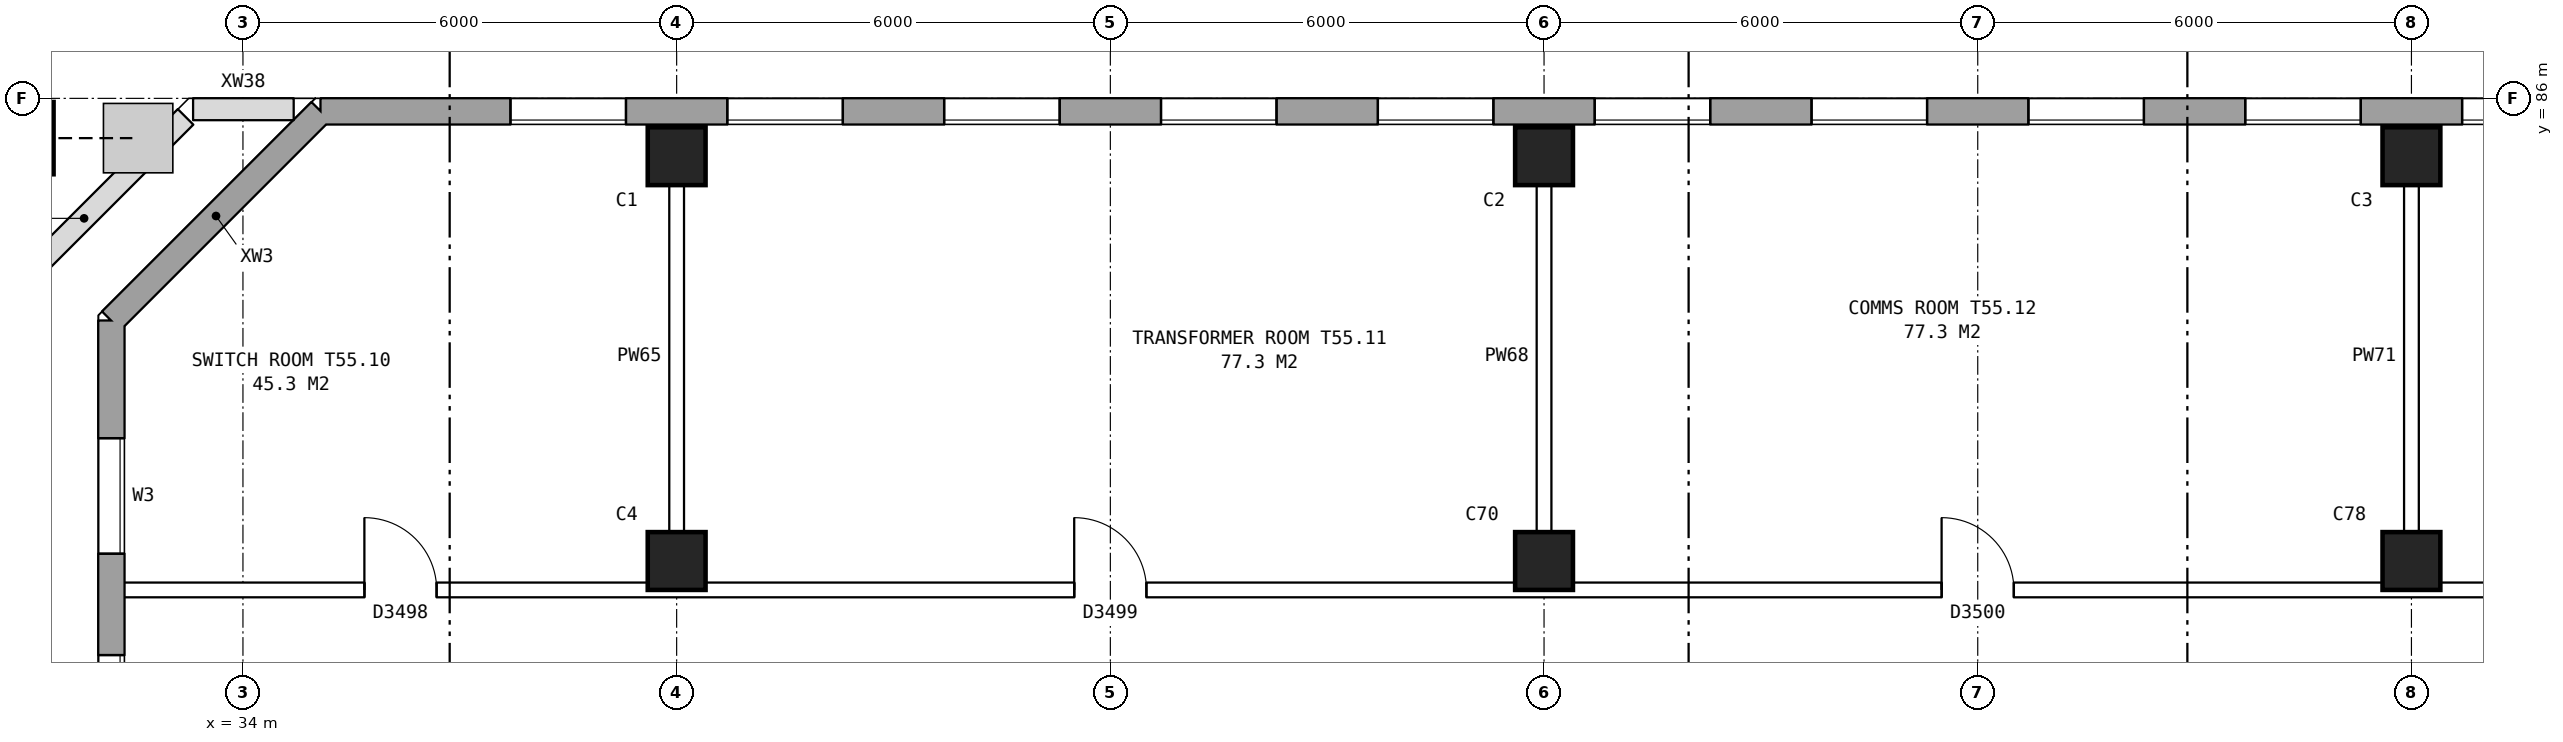
"""IFC4 building model, lengths in metres.
Left out: names, types, materials, properties, quantities, classifications, styles, units other than length and angle.
Written with IfcOpenShell. Run it as: python <this file> out.ifc"""

import sys

from ifc_helpers import new_model, si_unit, direction, frame, frame_2d, origin, origin_2d, place, context, subcontext, project, spatial, rectangle, hollow_rectangle, extrude, element, fill, save


model = new_model("IFC4")
c1 = context("Model", 3, precision=1e-05, world=origin(), true_north=direction((0.0, 1.0)))
c2 = subcontext(c1, "Body", "Model", "MODEL_VIEW")
j1 = project(units=[si_unit("LENGTHUNIT", "METRE"), si_unit("PLANEANGLEUNIT", "RADIAN")], contexts=[c1])
p1 = place(None, origin())
s1 = spatial("IfcSite", under=j1, at=p1, CompositionType="ELEMENT")
p2 = place(p1, origin())
s2 = spatial("IfcBuilding", under=s1, at=p2, CompositionType="ELEMENT")
p3 = place(p2, frame((0.0, 0.0, 194.4)))
s3 = spatial("IfcBuildingStorey", under=s2, at=p3, CompositionType="ELEMENT", Elevation=194.4)
for number, where, z_axis, x_axis in (
    (1, (40.0, 79.6, 0.0), (0.0, 0.0, 1.0), (1.0, 0.0, 0.0)),
    (2, (40.0, 85.2, 0.0), (0.0, 0.0, 1.0), (1.0, 0.0, 0.0)),
    (3, (52.0, 79.6, 0.0), (0.0, 0.0, 1.0), (1.0, 0.0, 0.0)),
    (4, (52.0, 85.2, 0.0), (0.0, 0.0, 1.0), (1.0, 0.0, 0.0)),
    (5, (64.0, 79.6, 0.0), (0.0, 0.0, 1.0), (1.0, 0.0, 0.0)),
    (6, (64.0, 85.2, 0.0), (0.0, 0.0, 1.0), (1.0, 0.0, 0.0)),
):
    element("IfcColumn", number, at=place(p3, frame(where, z_axis=z_axis, x_axis=x_axis)), inside=s3, PredefinedType="COLUMN", context=c2, shape_type="SweptSolid", body=[
        extrude(rectangle(XDim=0.8, YDim=0.8, at=origin_2d()), origin(), (0.0, 0.0, 1.0), 3.95),
    ])
p4 = place(p3, frame((30.88, 85.45, 0.192), z_axis=(0.384632160448, 0.0, 0.923069932968), x_axis=(0.0, 1.0, 0.0)))
e7 = element("IfcColumn", 7, at=p4, inside=s3, PredefinedType="COLUMN", context=c2, shape_type="SweptSolid", body=[
    extrude(hollow_rectangle(XDim=1.0, YDim=1.0, WallThickness=0.055, at=origin_2d()), origin(), (0.0, 0.0, 1.0), 4.133),
])
p5 = place(p3, frame((74.95, 85.82, 0.0), z_axis=(0.0, 0.0, 1.0), x_axis=(-1.0, 0.0, 0.0)))
e8 = element("IfcWall", 8, at=p5, inside=s3, PredefinedType="STANDARD", context=c2, shape_type="SweptSolid", body=[
    extrude(rectangle(XDim=39.875, YDim=0.36, at=frame_2d((19.938, 0.0))), origin(), (0.0, 0.0, 1.0), 3.95),
])
p6 = place(p5, frame((2.65, 0.0, 1.5)))
e9 = element("IfcOpeningElement", 9, at=p6, cuts=e8, PredefinedType="OPENING", context=c2, shape_type="SweptSolid", body=[
    extrude(rectangle(XDim=1.6, YDim=1.2, at=frame_2d((0.8, 0.6))), frame((0.0, 0.19, 0.0), z_axis=(0.0, -1.0, 0.0), x_axis=(1.0, 0.0, 0.0)), (0.0, 0.0, 1.0), 0.38),
])
p7 = place(p5, frame((5.65, 0.0, 1.5)))
e10 = element("IfcOpeningElement", 10, at=p7, cuts=e8, PredefinedType="OPENING", context=c2, shape_type="SweptSolid", body=[
    extrude(rectangle(XDim=1.6, YDim=1.2, at=frame_2d((0.8, 0.6))), frame((0.0, 0.19, 0.0), z_axis=(0.0, -1.0, 0.0), x_axis=(1.0, 0.0, 0.0)), (0.0, 0.0, 1.0), 0.38),
])
p8 = place(p5, frame((8.65, 0.0, 1.5)))
e11 = element("IfcOpeningElement", 11, at=p8, cuts=e8, PredefinedType="OPENING", context=c2, shape_type="SweptSolid", body=[
    extrude(rectangle(XDim=1.6, YDim=1.2, at=frame_2d((0.8, 0.6))), frame((0.0, 0.19, 0.0), z_axis=(0.0, -1.0, 0.0), x_axis=(1.0, 0.0, 0.0)), (0.0, 0.0, 1.0), 0.38),
])
p9 = place(p5, frame((11.65, 0.0, 1.5)))
e12 = element("IfcOpeningElement", 12, at=p9, cuts=e8, PredefinedType="OPENING", context=c2, shape_type="SweptSolid", body=[
    extrude(rectangle(XDim=1.6, YDim=1.2, at=frame_2d((0.8, 0.6))), frame((0.0, 0.19, 0.0), z_axis=(0.0, -1.0, 0.0), x_axis=(1.0, 0.0, 0.0)), (0.0, 0.0, 1.0), 0.38),
])
p10 = place(p5, frame((14.65, 0.0, 1.5)))
e13 = element("IfcOpeningElement", 13, at=p10, cuts=e8, PredefinedType="OPENING", context=c2, shape_type="SweptSolid", body=[
    extrude(rectangle(XDim=1.6, YDim=1.2, at=frame_2d((0.8, 0.6))), frame((0.0, 0.19, 0.0), z_axis=(0.0, -1.0, 0.0), x_axis=(1.0, 0.0, 0.0)), (0.0, 0.0, 1.0), 0.38),
])
p11 = place(p5, frame((17.65, 0.0, 1.5)))
e14 = element("IfcOpeningElement", 14, at=p11, cuts=e8, PredefinedType="OPENING", context=c2, shape_type="SweptSolid", body=[
    extrude(rectangle(XDim=1.6, YDim=1.2, at=frame_2d((0.8, 0.6))), frame((0.0, 0.19, 0.0), z_axis=(0.0, -1.0, 0.0), x_axis=(1.0, 0.0, 0.0)), (0.0, 0.0, 1.0), 0.38),
])
p12 = place(p5, frame((20.65, 0.0, 1.5)))
e15 = element("IfcOpeningElement", 15, at=p12, cuts=e8, PredefinedType="OPENING", context=c2, shape_type="SweptSolid", body=[
    extrude(rectangle(XDim=1.6, YDim=1.2, at=frame_2d((0.8, 0.6))), frame((0.0, 0.19, 0.0), z_axis=(0.0, -1.0, 0.0), x_axis=(1.0, 0.0, 0.0)), (0.0, 0.0, 1.0), 0.38),
])
p13 = place(p5, frame((23.65, 0.0, 1.5)))
e16 = element("IfcOpeningElement", 16, at=p13, cuts=e8, PredefinedType="OPENING", context=c2, shape_type="SweptSolid", body=[
    extrude(rectangle(XDim=1.6, YDim=1.2, at=frame_2d((0.8, 0.6))), frame((0.0, 0.19, 0.0), z_axis=(0.0, -1.0, 0.0), x_axis=(1.0, 0.0, 0.0)), (0.0, 0.0, 1.0), 0.38),
])
p14 = place(p5, frame((26.65, 0.0, 1.5)))
e17 = element("IfcOpeningElement", 17, at=p14, cuts=e8, PredefinedType="OPENING", context=c2, shape_type="SweptSolid", body=[
    extrude(rectangle(XDim=1.6, YDim=1.2, at=frame_2d((0.8, 0.6))), frame((0.0, 0.19, 0.0), z_axis=(0.0, -1.0, 0.0), x_axis=(1.0, 0.0, 0.0)), (0.0, 0.0, 1.0), 0.38),
])
p15 = place(p5, frame((29.65, 0.0, 1.5)))
e18 = element("IfcOpeningElement", 18, at=p15, cuts=e8, PredefinedType="OPENING", context=c2, shape_type="SweptSolid", body=[
    extrude(rectangle(XDim=1.6, YDim=1.2, at=frame_2d((0.8, 0.6))), frame((0.0, 0.19, 0.0), z_axis=(0.0, -1.0, 0.0), x_axis=(1.0, 0.0, 0.0)), (0.0, 0.0, 1.0), 0.38),
])
p16 = place(p5, frame((32.65, 0.0, 1.5)))
e19 = element("IfcOpeningElement", 19, at=p16, cuts=e8, PredefinedType="OPENING", context=c2, shape_type="SweptSolid", body=[
    extrude(rectangle(XDim=1.6, YDim=1.2, at=frame_2d((0.8, 0.6))), frame((0.0, 0.19, 0.0), z_axis=(0.0, -1.0, 0.0), x_axis=(1.0, 0.0, 0.0)), (0.0, 0.0, 1.0), 0.38),
])
p17 = place(p5, frame((35.65, 0.0, 1.5)))
e20 = element("IfcOpeningElement", 20, at=p17, cuts=e8, PredefinedType="OPENING", context=c2, shape_type="SweptSolid", body=[
    extrude(rectangle(XDim=1.6, YDim=1.2, at=frame_2d((0.8, 0.6))), frame((0.0, 0.19, 0.0), z_axis=(0.0, -1.0, 0.0), x_axis=(1.0, 0.0, 0.0)), (0.0, 0.0, 1.0), 0.38),
])
p18 = place(p3, frame((35.075, 85.82, 0.0), z_axis=(0.0, 0.0, 1.0), x_axis=(-0.707106781187, -0.707106781187, 0.0)))
e21 = element("IfcWall", 21, at=p18, inside=s3, PredefinedType="STANDARD", context=c2, shape_type="SweptSolid", body=[
    extrude(rectangle(XDim=4.094, YDim=0.36, at=frame_2d((2.047, 0.0))), origin(), (0.0, 0.0, 1.0), 3.95),
])
p19 = place(p3, frame((32.18, 82.925, 0.0), z_axis=(0.0, 0.0, 1.0), x_axis=(0.0, -1.0, 0.0)))
e22 = element("IfcWall", 22, at=p19, inside=s3, PredefinedType="STANDARD", context=c2, shape_type="SweptSolid", body=[
    extrude(rectangle(XDim=25.851, YDim=0.36, at=frame_2d((12.925, 0.0))), origin(), (0.0, 0.0, 1.0), 3.95),
])
p20 = place(p19, frame((1.625, 0.0, 1.5)))
e23 = element("IfcOpeningElement", 23, at=p20, cuts=e22, PredefinedType="OPENING", context=c2, shape_type="SweptSolid", body=[
    extrude(rectangle(XDim=1.6, YDim=1.2, at=frame_2d((0.8, 0.6))), frame((0.0, 0.19, 0.0), z_axis=(0.0, -1.0, 0.0), x_axis=(1.0, 0.0, 0.0)), (0.0, 0.0, 1.0), 0.38),
])
p21 = place(p19, frame((4.625, 0.0, 1.5)))
e24 = element("IfcOpeningElement", 24, at=p21, cuts=e22, PredefinedType="OPENING", context=c2, shape_type="SweptSolid", body=[
    extrude(rectangle(XDim=1.6, YDim=1.2, at=frame_2d((0.8, 0.6))), frame((0.0, 0.19, 0.0), z_axis=(0.0, -1.0, 0.0), x_axis=(1.0, 0.0, 0.0)), (0.0, 0.0, 1.0), 0.38),
])
p22 = place(p19, frame((19.625, 0.0, 1.5)))
e25 = element("IfcOpeningElement", 25, at=p22, cuts=e22, PredefinedType="OPENING", context=c2, shape_type="SweptSolid", body=[
    extrude(rectangle(XDim=1.6, YDim=1.2, at=frame_2d((0.8, 0.6))), frame((0.0, 0.19, 0.0), z_axis=(0.0, -1.0, 0.0), x_axis=(1.0, 0.0, 0.0)), (0.0, 0.0, 1.0), 0.38),
])
p23 = place(p19, frame((22.625, 0.0, 1.5)))
e26 = element("IfcOpeningElement", 26, at=p23, cuts=e22, PredefinedType="OPENING", context=c2, shape_type="SweptSolid", body=[
    extrude(rectangle(XDim=1.6, YDim=1.2, at=frame_2d((0.8, 0.6))), frame((0.0, 0.19, 0.0), z_axis=(0.0, -1.0, 0.0), x_axis=(1.0, 0.0, 0.0)), (0.0, 0.0, 1.0), 0.38),
])
p24 = place(p3, frame((34.7, 85.85, 0.0), z_axis=(0.0, 0.0, 1.0), x_axis=(-1.0, 0.0, 0.0)))
e27 = element("IfcWall", 27, at=p24, inside=s3, PredefinedType="PARAPET", context=c2, shape_type="SweptSolid", body=[
    extrude(rectangle(XDim=1.388, YDim=0.3, at=frame_2d((0.694, 0.0))), origin(), (0.0, 0.0, 1.0), 1.1),
])
p25 = place(p3, frame((33.205, 85.742, 0.0), z_axis=(0.0, 0.0, 1.0), x_axis=(-0.707137557743, -0.70707600329, 0.0)))
e28 = element("IfcWall", 28, at=p25, inside=s3, PredefinedType="PARAPET", context=c2, shape_type="SweptSolid", body=[
    extrude(rectangle(XDim=3.966, YDim=0.3, at=frame_2d((1.983, 0.0))), origin(), (0.0, 0.0, 1.0), 1.1),
])
p26 = place(p3, frame((32.24, 79.2, 0.0), z_axis=(0.0, 0.0, 1.0), x_axis=(1.0, 0.0, 0.0)))
e29 = element("IfcWall", 29, at=p26, inside=s3, PredefinedType="PARTITIONING", context=c2, shape_type="SweptSolid", body=[
    extrude(rectangle(XDim=57.61, YDim=0.2, at=frame_2d((28.805, 0.0))), origin(), (0.0, 0.0, 1.0), 3.95),
])
p27 = place(p26, frame((3.44, 0.0, 0.0)))
e30 = element("IfcOpeningElement", 30, at=p27, cuts=e29, PredefinedType="OPENING", context=c2, shape_type="SweptSolid", body=[
    extrude(rectangle(XDim=1.0, YDim=2.1, at=frame_2d((0.5, 1.05))), frame((0.0, 0.11, 0.0), z_axis=(0.0, -1.0, 0.0), x_axis=(1.0, 0.0, 0.0)), (0.0, 0.0, 1.0), 0.22),
])
p28 = place(p26, frame((13.26, 0.0, 0.0)))
e31 = element("IfcOpeningElement", 31, at=p28, cuts=e29, PredefinedType="OPENING", context=c2, shape_type="SweptSolid", body=[
    extrude(rectangle(XDim=1.0, YDim=2.1, at=frame_2d((0.5, 1.05))), frame((0.0, 0.11, 0.0), z_axis=(0.0, -1.0, 0.0), x_axis=(1.0, 0.0, 0.0)), (0.0, 0.0, 1.0), 0.22),
])
p29 = place(p26, frame((25.26, 0.0, 0.0)))
e32 = element("IfcOpeningElement", 32, at=p29, cuts=e29, PredefinedType="OPENING", context=c2, shape_type="SweptSolid", body=[
    extrude(rectangle(XDim=1.0, YDim=2.1, at=frame_2d((0.5, 1.05))), frame((0.0, 0.11, 0.0), z_axis=(0.0, -1.0, 0.0), x_axis=(1.0, 0.0, 0.0)), (0.0, 0.0, 1.0), 0.22),
])
p30 = place(p26, frame((37.08, 0.0, 0.0)))
e33 = element("IfcOpeningElement", 33, at=p30, cuts=e29, PredefinedType="OPENING", context=c2, shape_type="SweptSolid", body=[
    extrude(rectangle(XDim=1.0, YDim=2.1, at=frame_2d((0.5, 1.05))), frame((0.0, 0.11, 0.0), z_axis=(0.0, -1.0, 0.0), x_axis=(1.0, 0.0, 0.0)), (0.0, 0.0, 1.0), 0.22),
])
p31 = place(p26, frame((49.955, 0.0, 0.0)))
e34 = element("IfcOpeningElement", 34, at=p31, cuts=e29, PredefinedType="OPENING", context=c2, shape_type="SweptSolid", body=[
    extrude(rectangle(XDim=1.0, YDim=2.1, at=frame_2d((0.5, 1.05))), frame((0.0, 0.11, 0.0), z_axis=(0.0, -1.0, 0.0), x_axis=(1.0, 0.0, 0.0)), (0.0, 0.0, 1.0), 0.22),
])
for number, where, z_axis, x_axis in (
    (35, (40.0, 79.1, 0.0), (0.0, 0.0, 1.0), (0.0, 1.0, 0.0)),
    (36, (52.0, 79.1, 0.0), (0.0, 0.0, 1.0), (0.0, 1.0, 0.0)),
    (37, (64.0, 79.1, 0.0), (0.0, 0.0, 1.0), (0.0, 1.0, 0.0)),
):
    element("IfcWall", number, at=place(p3, frame(where, z_axis=z_axis, x_axis=x_axis)), inside=s3, PredefinedType="PARTITIONING", context=c2, shape_type="SweptSolid", body=[
        extrude(rectangle(XDim=6.66, YDim=0.2, at=frame_2d((3.33, 0.0))), origin(), (0.0, 0.0, 1.0), 3.95),
    ])
p32 = place(p8, origin())
e38 = element("IfcWindow", 38, at=p32, inside=s3, PartitioningType="DOUBLE_PANEL_HORIZONTAL", PredefinedType="WINDOW", context=c2, shape_type="SweptSolid", body=[
    extrude(rectangle(XDim=1.6, YDim=1.2, at=frame_2d((0.8, 0.6))), frame((0.0, 0.15, 0.0), z_axis=(0.0, -1.0, 0.0), x_axis=(1.0, 0.0, 0.0)), (0.0, 0.0, 1.0), 0.06),
])
fill(e11, e38)
p33 = place(p9, origin())
e39 = element("IfcWindow", 39, at=p33, inside=s3, PartitioningType="DOUBLE_PANEL_HORIZONTAL", PredefinedType="WINDOW", context=c2, shape_type="SweptSolid", body=[
    extrude(rectangle(XDim=1.6, YDim=1.2, at=frame_2d((0.8, 0.6))), frame((0.0, 0.15, 0.0), z_axis=(0.0, -1.0, 0.0), x_axis=(1.0, 0.0, 0.0)), (0.0, 0.0, 1.0), 0.06),
])
fill(e12, e39)
p34 = place(p10, origin())
e40 = element("IfcWindow", 40, at=p34, inside=s3, PartitioningType="DOUBLE_PANEL_HORIZONTAL", PredefinedType="WINDOW", context=c2, shape_type="SweptSolid", body=[
    extrude(rectangle(XDim=1.6, YDim=1.2, at=frame_2d((0.8, 0.6))), frame((0.0, 0.15, 0.0), z_axis=(0.0, -1.0, 0.0), x_axis=(1.0, 0.0, 0.0)), (0.0, 0.0, 1.0), 0.06),
])
fill(e13, e40)
p35 = place(p11, origin())
e41 = element("IfcWindow", 41, at=p35, inside=s3, PartitioningType="DOUBLE_PANEL_HORIZONTAL", PredefinedType="WINDOW", context=c2, shape_type="SweptSolid", body=[
    extrude(rectangle(XDim=1.6, YDim=1.2, at=frame_2d((0.8, 0.6))), frame((0.0, 0.15, 0.0), z_axis=(0.0, -1.0, 0.0), x_axis=(1.0, 0.0, 0.0)), (0.0, 0.0, 1.0), 0.06),
])
fill(e14, e41)
p36 = place(p12, origin())
e42 = element("IfcWindow", 42, at=p36, inside=s3, PartitioningType="DOUBLE_PANEL_HORIZONTAL", PredefinedType="WINDOW", context=c2, shape_type="SweptSolid", body=[
    extrude(rectangle(XDim=1.6, YDim=1.2, at=frame_2d((0.8, 0.6))), frame((0.0, 0.15, 0.0), z_axis=(0.0, -1.0, 0.0), x_axis=(1.0, 0.0, 0.0)), (0.0, 0.0, 1.0), 0.06),
])
fill(e15, e42)
p37 = place(p13, origin())
e43 = element("IfcWindow", 43, at=p37, inside=s3, PartitioningType="DOUBLE_PANEL_HORIZONTAL", PredefinedType="WINDOW", context=c2, shape_type="SweptSolid", body=[
    extrude(rectangle(XDim=1.6, YDim=1.2, at=frame_2d((0.8, 0.6))), frame((0.0, 0.15, 0.0), z_axis=(0.0, -1.0, 0.0), x_axis=(1.0, 0.0, 0.0)), (0.0, 0.0, 1.0), 0.06),
])
fill(e16, e43)
p38 = place(p14, origin())
e44 = element("IfcWindow", 44, at=p38, inside=s3, PartitioningType="DOUBLE_PANEL_HORIZONTAL", PredefinedType="WINDOW", context=c2, shape_type="SweptSolid", body=[
    extrude(rectangle(XDim=1.6, YDim=1.2, at=frame_2d((0.8, 0.6))), frame((0.0, 0.15, 0.0), z_axis=(0.0, -1.0, 0.0), x_axis=(1.0, 0.0, 0.0)), (0.0, 0.0, 1.0), 0.06),
])
fill(e17, e44)
p39 = place(p15, origin())
e45 = element("IfcWindow", 45, at=p39, inside=s3, PartitioningType="DOUBLE_PANEL_HORIZONTAL", PredefinedType="WINDOW", context=c2, shape_type="SweptSolid", body=[
    extrude(rectangle(XDim=1.6, YDim=1.2, at=frame_2d((0.8, 0.6))), frame((0.0, 0.15, 0.0), z_axis=(0.0, -1.0, 0.0), x_axis=(1.0, 0.0, 0.0)), (0.0, 0.0, 1.0), 0.06),
])
fill(e18, e45)
p40 = place(p16, origin())
e46 = element("IfcWindow", 46, at=p40, inside=s3, PartitioningType="DOUBLE_PANEL_HORIZONTAL", PredefinedType="WINDOW", context=c2, shape_type="SweptSolid", body=[
    extrude(rectangle(XDim=1.6, YDim=1.2, at=frame_2d((0.8, 0.6))), frame((0.0, 0.15, 0.0), z_axis=(0.0, -1.0, 0.0), x_axis=(1.0, 0.0, 0.0)), (0.0, 0.0, 1.0), 0.06),
])
fill(e19, e46)
p41 = place(p17, origin())
e47 = element("IfcWindow", 47, at=p41, inside=s3, PartitioningType="DOUBLE_PANEL_HORIZONTAL", PredefinedType="WINDOW", context=c2, shape_type="SweptSolid", body=[
    extrude(rectangle(XDim=1.6, YDim=1.2, at=frame_2d((0.8, 0.6))), frame((0.0, 0.15, 0.0), z_axis=(0.0, -1.0, 0.0), x_axis=(1.0, 0.0, 0.0)), (0.0, 0.0, 1.0), 0.06),
])
fill(e20, e47)
p42 = place(p20, origin())
e48 = element("IfcWindow", 48, at=p42, inside=s3, PartitioningType="DOUBLE_PANEL_HORIZONTAL", PredefinedType="WINDOW", context=c2, shape_type="SweptSolid", body=[
    extrude(rectangle(XDim=1.6, YDim=1.2, at=frame_2d((0.8, 0.6))), frame((0.0, 0.15, 0.0), z_axis=(0.0, -1.0, 0.0), x_axis=(1.0, 0.0, 0.0)), (0.0, 0.0, 1.0), 0.06),
])
fill(e23, e48)
p43 = place(p21, origin())
e49 = element("IfcWindow", 49, at=p43, inside=s3, PartitioningType="DOUBLE_PANEL_HORIZONTAL", PredefinedType="WINDOW", context=c2, shape_type="SweptSolid", body=[
    extrude(rectangle(XDim=1.6, YDim=1.2, at=frame_2d((0.8, 0.6))), frame((0.0, 0.15, 0.0), z_axis=(0.0, -1.0, 0.0), x_axis=(1.0, 0.0, 0.0)), (0.0, 0.0, 1.0), 0.06),
])
fill(e24, e49)
p44 = place(p27, origin())
e50 = element("IfcDoor", 50, at=p44, inside=s3, OperationType="SINGLE_SWING_LEFT", PredefinedType="DOOR", context=c2, shape_type="SweptSolid", body=[
    extrude(rectangle(XDim=1.0, YDim=2.1, at=frame_2d((0.5, 1.05))), frame((0.0, 0.025, 0.0), z_axis=(0.0, -1.0, 0.0), x_axis=(1.0, 0.0, 0.0)), (0.0, 0.0, 1.0), 0.05),
])
fill(e30, e50)
p45 = place(p28, origin())
e51 = element("IfcDoor", 51, at=p45, inside=s3, OperationType="SINGLE_SWING_LEFT", PredefinedType="DOOR", context=c2, shape_type="SweptSolid", body=[
    extrude(rectangle(XDim=1.0, YDim=2.1, at=frame_2d((0.5, 1.05))), frame((0.0, 0.025, 0.0), z_axis=(0.0, -1.0, 0.0), x_axis=(1.0, 0.0, 0.0)), (0.0, 0.0, 1.0), 0.05),
])
fill(e31, e51)
p46 = place(p29, origin())
e52 = element("IfcDoor", 52, at=p46, inside=s3, OperationType="SINGLE_SWING_LEFT", PredefinedType="DOOR", context=c2, shape_type="SweptSolid", body=[
    extrude(rectangle(XDim=1.0, YDim=2.1, at=frame_2d((0.5, 1.05))), frame((0.0, 0.025, 0.0), z_axis=(0.0, -1.0, 0.0), x_axis=(1.0, 0.0, 0.0)), (0.0, 0.0, 1.0), 0.05),
])
fill(e32, e52)
save(model, sys.argv[1])
